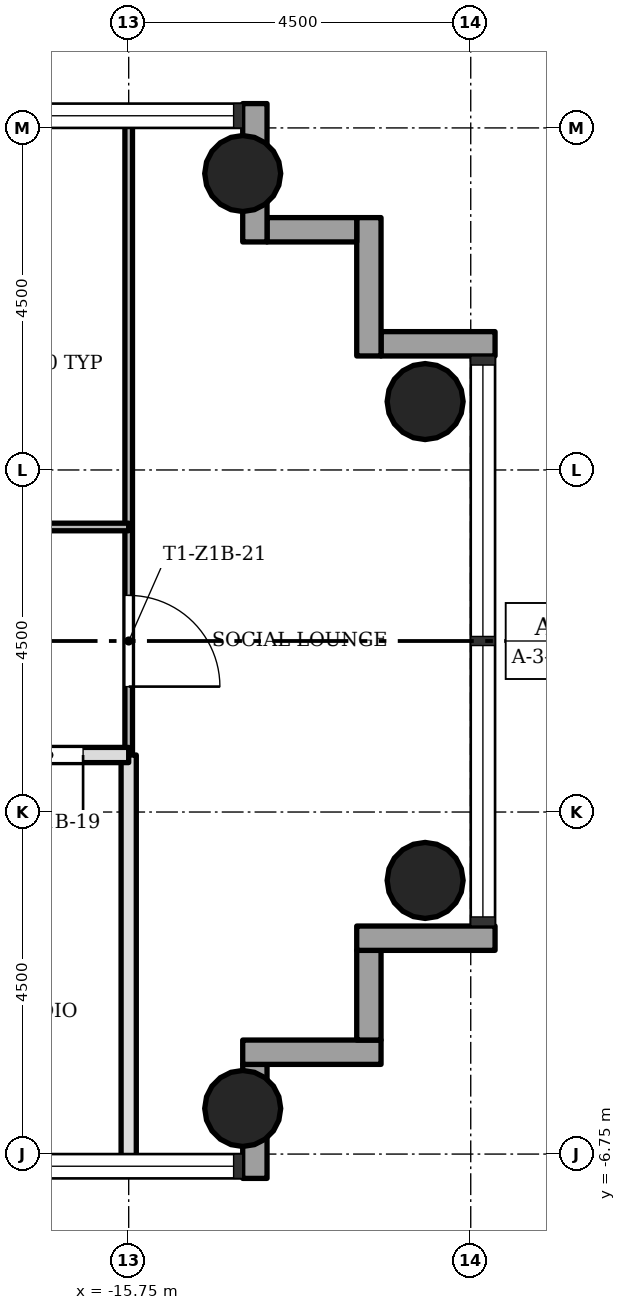
"""IFC4 building model, lengths in metres.
Left out: names, types, materials, properties, quantities, classifications, styles, units other than length and angle.
Written with IfcOpenShell. Run it as: python <this file> out.ifc"""

import sys

from ifc_helpers import new_model, si_unit, direction, frame, frame_2d, origin, origin_2d, place, context, subcontext, project, spatial, rectangle, hollow_circle, extrude, element, fill, save


model = new_model("IFC4")
c1 = context("Model", 3, precision=1e-05, world=origin(), true_north=direction((0.0, 1.0)))
c2 = subcontext(c1, "Body", "Model", "MODEL_VIEW")
j1 = project(units=[si_unit("LENGTHUNIT", "METRE"), si_unit("PLANEANGLEUNIT", "RADIAN")], contexts=[c1])
p1 = place(None, origin())
s1 = spatial("IfcSite", under=j1, at=p1, CompositionType="ELEMENT")
p2 = place(p1, origin())
s2 = spatial("IfcBuilding", under=s1, at=p2, CompositionType="ELEMENT")
p3 = place(p2, frame((0.0, 0.0, 41.5)))
s3 = spatial("IfcBuildingStorey", under=s2, at=p3, CompositionType="ELEMENT", Elevation=41.5)
for number, where, z_axis, x_axis in (
    (1, (-14.25, -6.15, 0.0), (0.0, 0.0, 1.0), (1.0, 0.0, 0.0)),
    (2, (-14.25, 6.15, 0.0), (0.0, 0.0, 1.0), (1.0, 0.0, 0.0)),
    (3, (-11.85, -3.15, 0.0), (0.0, 0.0, 1.0), (1.0, 0.0, 0.0)),
    (4, (-11.85, 3.15, 0.0), (0.0, 0.0, 1.0), (1.0, 0.0, 0.0)),
):
    element("IfcColumn", number, at=place(p3, frame(where, z_axis=z_axis, x_axis=x_axis)), inside=s3, PredefinedType="COLUMN", context=c2, shape_type="SweptSolid", body=[
        extrude(hollow_circle(Radius=0.5, WallThickness=0.036, at=origin_2d()), origin(), (0.0, 0.0, 1.0), 3.4),
    ])
p4 = place(p3, frame((-14.09, -7.07, -0.3), z_axis=(0.0, 0.0, 1.0), x_axis=(0.0, 1.0, 0.0)))
e5 = element("IfcWall", 5, at=p4, inside=s3, PredefinedType="STANDARD", context=c2, shape_type="SweptSolid", body=[
    extrude(rectangle(XDim=1.5, YDim=0.32, at=frame_2d((0.75, 0.0))), origin(), (0.0, 0.0, 1.0), 3.4),
])
p5 = place(p3, frame((-14.25, -5.41, -0.3), z_axis=(0.0, 0.0, 1.0), x_axis=(1.0, 0.0, 0.0)))
e6 = element("IfcWall", 6, at=p5, inside=s3, PredefinedType="STANDARD", context=c2, shape_type="SweptSolid", body=[
    extrude(rectangle(XDim=1.82, YDim=0.32, at=frame_2d((0.91, 0.0))), origin(), (0.0, 0.0, 1.0), 3.4),
])
p6 = place(p3, frame((-12.59, -5.25, -0.3), z_axis=(0.0, 0.0, 1.0), x_axis=(0.0, 1.0, 0.0)))
e7 = element("IfcWall", 7, at=p6, inside=s3, PredefinedType="STANDARD", context=c2, shape_type="SweptSolid", body=[
    extrude(rectangle(XDim=1.18, YDim=0.32, at=frame_2d((0.59, 0.0))), origin(), (0.0, 0.0, 1.0), 3.4),
])
p7 = place(p3, frame((-12.75, -3.91, -0.3), z_axis=(0.0, 0.0, 1.0), x_axis=(1.0, 0.0, 0.0)))
e8 = element("IfcWall", 8, at=p7, inside=s3, PredefinedType="STANDARD", context=c2, shape_type="SweptSolid", body=[
    extrude(rectangle(XDim=1.82, YDim=0.32, at=frame_2d((0.91, 0.0))), origin(), (0.0, 0.0, 1.0), 3.4),
])
p8 = place(p3, frame((-10.93, 3.91, -0.3), z_axis=(0.0, 0.0, 1.0), x_axis=(-1.0, 0.0, 0.0)))
e9 = element("IfcWall", 9, at=p8, inside=s3, PredefinedType="STANDARD", context=c2, shape_type="SweptSolid", body=[
    extrude(rectangle(XDim=1.5, YDim=0.32, at=frame_2d((0.75, 0.0))), origin(), (0.0, 0.0, 1.0), 3.4),
])
p9 = place(p3, frame((-12.59, 3.75, -0.3), z_axis=(0.0, 0.0, 1.0), x_axis=(0.0, 1.0, 0.0)))
e10 = element("IfcWall", 10, at=p9, inside=s3, PredefinedType="STANDARD", context=c2, shape_type="SweptSolid", body=[
    extrude(rectangle(XDim=1.82, YDim=0.32, at=frame_2d((0.91, 0.0))), origin(), (0.0, 0.0, 1.0), 3.4),
])
p10 = place(p3, frame((-12.75, 5.41, -0.3), z_axis=(0.0, 0.0, 1.0), x_axis=(-1.0, 0.0, 0.0)))
e11 = element("IfcWall", 11, at=p10, inside=s3, PredefinedType="STANDARD", context=c2, shape_type="SweptSolid", body=[
    extrude(rectangle(XDim=1.18, YDim=0.32, at=frame_2d((0.59, 0.0))), origin(), (0.0, 0.0, 1.0), 3.4),
])
p11 = place(p3, frame((-14.09, 5.25, -0.3), z_axis=(0.0, 0.0, 1.0), x_axis=(0.0, 1.0, 0.0)))
e12 = element("IfcWall", 12, at=p11, inside=s3, PredefinedType="STANDARD", context=c2, shape_type="SweptSolid", body=[
    extrude(rectangle(XDim=1.82, YDim=0.32, at=frame_2d((0.91, 0.0))), origin(), (0.0, 0.0, 1.0), 3.4),
])
p12 = place(p3, frame((-15.75, -1.5, 0.0), z_axis=(0.0, 0.0, 1.0), x_axis=(0.0, 1.0, 0.0)))
e13 = element("IfcWall", 13, at=p12, inside=s3, PredefinedType="PARTITIONING", context=c2, shape_type="SweptSolid", body=[
    extrude(rectangle(XDim=8.35, YDim=0.1, at=frame_2d((4.175, 0.0))), origin(), (0.0, 0.0, 1.0), 3.0),
])
p13 = place(p12, frame((0.9, 0.0, 0.0)))
e14 = element("IfcOpeningElement", 14, at=p13, cuts=e13, PredefinedType="OPENING", context=c2, shape_type="SweptSolid", body=[
    extrude(rectangle(XDim=1.2, YDim=2.1, at=frame_2d((0.6, 1.05))), frame((0.0, 0.06, 0.0), z_axis=(0.0, -1.0, 0.0), x_axis=(1.0, 0.0, 0.0)), (0.0, 0.0, 1.0), 0.12),
])
p14 = place(p3, frame((-15.75, -6.85, 0.0), z_axis=(0.0, 0.0, 1.0), x_axis=(0.0, 1.0, 0.0)))
e15 = element("IfcWall", 15, at=p14, inside=s3, PredefinedType="SOLIDWALL", context=c2, shape_type="SweptSolid", body=[
    extrude(rectangle(XDim=5.35, YDim=0.2, at=frame_2d((2.675, 0.0))), origin(), (0.0, 0.0, 1.0), 3.0),
])
p15 = place(p3, frame((-20.25, -1.5, 0.0), z_axis=(0.0, 0.0, 1.0), x_axis=(1.0, 0.0, 0.0)))
e16 = element("IfcWall", 16, at=p15, inside=s3, PredefinedType="SOLIDWALL", context=c2, shape_type="SweptSolid", body=[
    extrude(rectangle(XDim=4.5, YDim=0.2, at=frame_2d((2.25, 0.0))), origin(), (0.0, 0.0, 1.0), 3.0),
])
p16 = place(p15, frame((3.0, 0.0, 0.0)))
e17 = element("IfcOpeningElement", 17, at=p16, cuts=e16, PredefinedType="OPENING", context=c2, shape_type="SweptSolid", body=[
    extrude(rectangle(XDim=0.9, YDim=2.1, at=frame_2d((0.45, 1.05))), frame((0.0, 0.11, 0.0), z_axis=(0.0, -1.0, 0.0), x_axis=(1.0, 0.0, 0.0)), (0.0, 0.0, 1.0), 0.22),
])
p17 = place(p3, frame((-20.25, 1.5, 0.0), z_axis=(0.0, 0.0, 1.0), x_axis=(1.0, 0.0, 0.0)))
e18 = element("IfcWall", 18, at=p17, inside=s3, PredefinedType="PARTITIONING", context=c2, shape_type="SweptSolid", body=[
    extrude(rectangle(XDim=4.5, YDim=0.1, at=frame_2d((2.25, 0.0))), origin(), (0.0, 0.0, 1.0), 3.0),
])
p18 = place(p17, frame((1.8, 0.0, 0.0)))
e19 = element("IfcOpeningElement", 19, at=p18, cuts=e18, PredefinedType="OPENING", context=c2, shape_type="SweptSolid", body=[
    extrude(rectangle(XDim=0.9, YDim=2.1, at=frame_2d((0.45, 1.05))), frame((0.0, 0.06, 0.0), z_axis=(0.0, -1.0, 0.0), x_axis=(1.0, 0.0, 0.0)), (0.0, 0.0, 1.0), 0.12),
])
p19 = place(p16, origin())
e20 = element("IfcDoor", 20, at=p19, inside=s3, OperationType="SINGLE_SWING_RIGHT", PredefinedType="DOOR", context=c2, shape_type="SweptSolid", body=[
    extrude(rectangle(XDim=0.9, YDim=2.1, at=frame_2d((0.45, 1.05))), frame((0.0, 0.025, 0.0), z_axis=(0.0, -1.0, 0.0), x_axis=(1.0, 0.0, 0.0)), (0.0, 0.0, 1.0), 0.05),
])
fill(e17, e20)
p20 = place(p13, origin())
e21 = element("IfcDoor", 21, at=p20, inside=s3, OperationType="SINGLE_SWING_LEFT", PredefinedType="DOOR", context=c2, shape_type="SweptSolid", body=[
    extrude(rectangle(XDim=1.2, YDim=2.1, at=frame_2d((0.6, 1.05))), frame((0.0, 0.025, 0.0), z_axis=(0.0, -1.0, 0.0), x_axis=(1.0, 0.0, 0.0)), (0.0, 0.0, 1.0), 0.05),
])
fill(e14, e21)
save(model, sys.argv[1])
